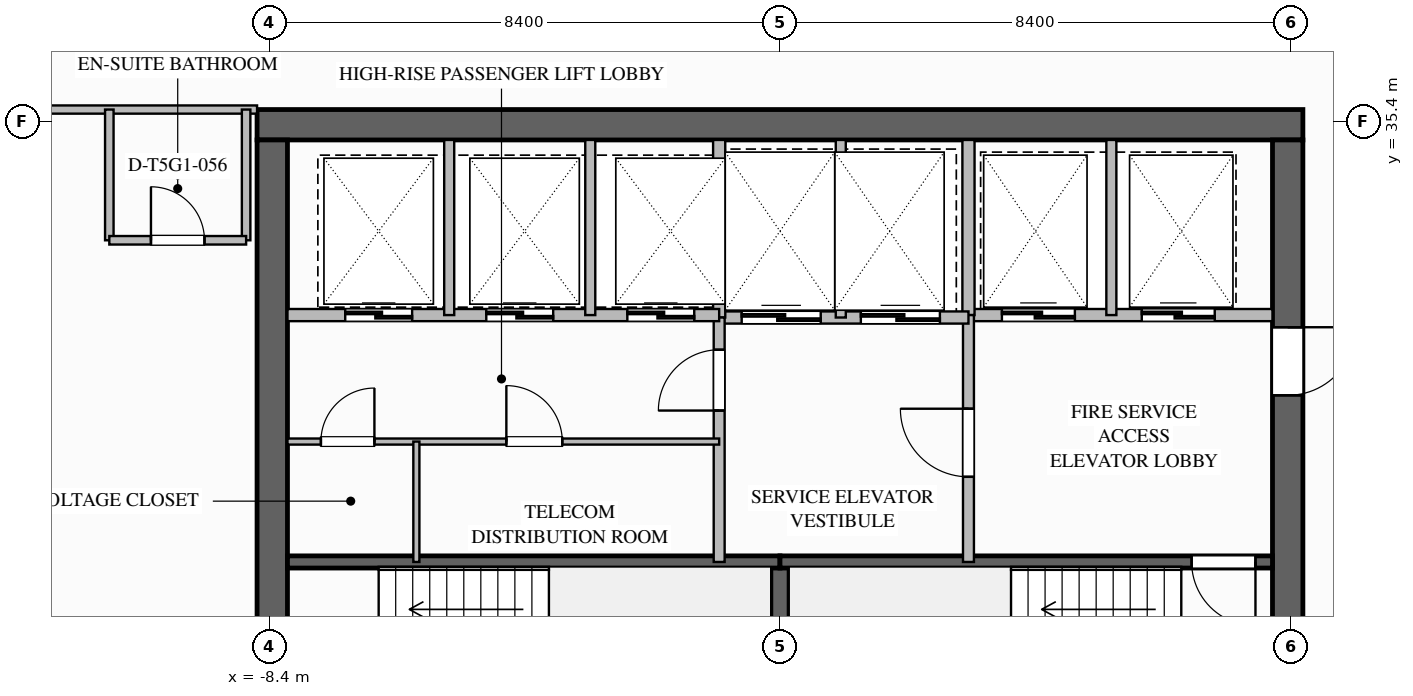
"""IFC4 building model, lengths in metres.
Left out: names, types, materials, properties, quantities, classifications, styles, units other than length and angle.
Written with IfcOpenShell. Run it as: python <this file> out.ifc"""

import sys

from ifc_helpers import new_model, si_unit, direction, frame, frame_2d, origin, place, context, subcontext, project, spatial, rectangle, extrude, element, fill, save


model = new_model("IFC4")
c1 = context("Model", 3, precision=1e-05, world=origin(), true_north=direction((0.0, 1.0)))
c2 = subcontext(c1, "Body", "Model", "MODEL_VIEW")
j1 = project(units=[si_unit("LENGTHUNIT", "METRE"), si_unit("PLANEANGLEUNIT", "RADIAN")], contexts=[c1])
p1 = place(None, origin())
s1 = spatial("IfcSite", under=j1, at=p1, CompositionType="ELEMENT")
p2 = place(p1, origin())
s2 = spatial("IfcBuilding", under=s1, at=p2, CompositionType="ELEMENT")
p3 = place(p2, frame((0.0, 0.0, 268.65)))
s3 = spatial("IfcBuildingStorey", under=s2, at=p3, CompositionType="ELEMENT", Elevation=268.65)
p4 = place(p3, frame((-8.6, 35.35, 0.0), z_axis=(0.0, 0.0, 1.0), x_axis=(1.0, 0.0, 0.0)))
e1 = element("IfcWall", 1, at=p4, inside=s3, PredefinedType="SHEAR", context=c2, shape_type="SweptSolid", body=[
    extrude(rectangle(XDim=17.2, YDim=0.5, at=frame_2d((8.6, 0.0))), origin(), (0.0, 0.0, 1.0), 3.65),
])
p5 = place(p3, frame((8.35, 35.1, 0.0), z_axis=(0.0, 0.0, 1.0), x_axis=(0.0, -1.0, 0.0)))
e2 = element("IfcWall", 2, at=p5, inside=s3, PredefinedType="SHEAR", context=c2, shape_type="SweptSolid", body=[
    extrude(rectangle(XDim=16.2, YDim=0.5, at=frame_2d((8.1, 0.0))), origin(), (0.0, 0.0, 1.0), 3.65),
])
p6 = place(p5, frame((3.08, 0.0, 0.0)))
e3 = element("IfcOpeningElement", 3, at=p6, cuts=e2, PredefinedType="OPENING", context=c2, shape_type="SweptSolid", body=[
    extrude(rectangle(XDim=1.12, YDim=2.1, at=frame_2d((0.56, 1.05))), frame((0.0, 0.26, 0.0), z_axis=(0.0, -1.0, 0.0), x_axis=(1.0, 0.0, 0.0)), (0.0, 0.0, 1.0), 0.52),
])
p7 = place(p5, frame((10.62, 0.0, 0.0)))
e4 = element("IfcOpeningElement", 4, at=p7, cuts=e2, PredefinedType="OPENING", context=c2, shape_type="SweptSolid", body=[
    extrude(rectangle(XDim=1.08, YDim=2.04, at=frame_2d((0.54, 1.02))), frame((0.0, 0.26, 0.0), z_axis=(0.0, -1.0, 0.0), x_axis=(1.0, 0.0, 0.0)), (0.0, 0.0, 1.0), 0.52),
])
p8 = place(p3, frame((-8.35, 18.9, 0.0), z_axis=(0.0, 0.0, 1.0), x_axis=(0.0, 1.0, 0.0)))
e5 = element("IfcWall", 5, at=p8, inside=s3, PredefinedType="SHEAR", context=c2, shape_type="SweptSolid", body=[
    extrude(rectangle(XDim=16.2, YDim=0.5, at=frame_2d((8.1, 0.0))), origin(), (0.0, 0.0, 1.0), 3.65),
])
p9 = place(p3, frame((0.0, 25.04, 0.0), z_axis=(0.0, 0.0, 1.0), x_axis=(0.0, 1.0, 0.0)))
e6 = element("IfcWall", 6, at=p9, inside=s3, PredefinedType="SOLIDWALL", context=c2, shape_type="SweptSolid", body=[
    extrude(rectangle(XDim=3.12, YDim=0.3, at=frame_2d((1.56, 0.0))), origin(), (0.0, 0.0, 1.0), 3.39),
])
p10 = place(p3, frame((-8.1, 28.16, 0.0), z_axis=(0.0, 0.0, 1.0), x_axis=(1.0, 0.0, 0.0)))
e7 = element("IfcWall", 7, at=p10, inside=s3, PredefinedType="SOLIDWALL", context=c2, shape_type="SweptSolid", body=[
    extrude(rectangle(XDim=8.1, YDim=0.2, at=frame_2d((4.05, 0.0))), origin(), (0.0, 0.0, 1.0), 3.39),
])
p11 = place(p3, frame((8.1, 28.16, 0.0), z_axis=(0.0, 0.0, 1.0), x_axis=(-1.0, 0.0, 0.0)))
e8 = element("IfcWall", 8, at=p11, inside=s3, PredefinedType="SOLIDWALL", context=c2, shape_type="SweptSolid", body=[
    extrude(rectangle(XDim=8.1, YDim=0.2, at=frame_2d((4.05, 0.0))), origin(), (0.0, 0.0, 1.0), 3.39),
])
p12 = place(p11, frame((0.28, 0.0, 0.0)))
e9 = element("IfcOpeningElement", 9, at=p12, cuts=e8, PredefinedType="OPENING", context=c2, shape_type="SweptSolid", body=[
    extrude(rectangle(XDim=1.05, YDim=2.1, at=frame_2d((0.525, 1.05))), frame((0.0, 0.11, 0.0), z_axis=(0.0, -1.0, 0.0), x_axis=(1.0, 0.0, 0.0)), (0.0, 0.0, 1.0), 0.22),
])
p13 = place(p3, frame((3.1, 32.22, 0.0), z_axis=(0.0, 0.0, 1.0), x_axis=(1.0, 0.0, 0.0)))
e10 = element("IfcWall", 10, at=p13, inside=s3, PredefinedType="SOLIDWALL", context=c2, shape_type="SweptSolid", body=[
    extrude(rectangle(XDim=5.0, YDim=0.2, at=frame_2d((2.5, 0.0))), origin(), (0.0, 0.0, 1.0), 3.39),
])
p14 = place(p13, frame((0.55, 0.0, 0.0)))
e11 = element("IfcOpeningElement", 11, at=p14, cuts=e10, PredefinedType="OPENING", context=c2, shape_type="SweptSolid", body=[
    extrude(rectangle(XDim=1.2, YDim=2.2, at=frame_2d((0.6, 1.1))), frame((0.0, 0.11, 0.0), z_axis=(0.0, -1.0, 0.0), x_axis=(1.0, 0.0, 0.0)), (0.0, 0.0, 1.0), 0.22),
])
p15 = place(p13, frame((2.85, 0.0, 0.0)))
e12 = element("IfcOpeningElement", 12, at=p15, cuts=e10, PredefinedType="OPENING", context=c2, shape_type="SweptSolid", body=[
    extrude(rectangle(XDim=1.2, YDim=2.2, at=frame_2d((0.6, 1.1))), frame((0.0, 0.11, 0.0), z_axis=(0.0, -1.0, 0.0), x_axis=(1.0, 0.0, 0.0)), (0.0, 0.0, 1.0), 0.22),
])
p16 = place(p3, frame((3.1, 32.22, 0.0), z_axis=(0.0, 0.0, 1.0), x_axis=(0.0, 1.0, 0.0)))
e13 = element("IfcWall", 13, at=p16, inside=s3, PredefinedType="SOLIDWALL", context=c2, shape_type="SweptSolid", body=[
    extrude(rectangle(XDim=2.88, YDim=0.2, at=frame_2d((1.44, 0.0))), origin(), (0.0, 0.0, 1.0), 3.39),
])
p17 = place(p3, frame((5.45, 32.22, 0.0), z_axis=(0.0, 0.0, 1.0), x_axis=(0.0, 1.0, 0.0)))
e14 = element("IfcWall", 14, at=p17, inside=s3, PredefinedType="PARTITIONING", context=c2, shape_type="SweptSolid", body=[
    extrude(rectangle(XDim=2.88, YDim=0.165, at=frame_2d((1.44, 0.0))), origin(), (0.0, 0.0, 1.0), 3.39),
])
p18 = place(p3, frame((3.1, 28.16, 0.0), z_axis=(0.0, 0.0, 1.0), x_axis=(0.0, 1.0, 0.0)))
e15 = element("IfcWall", 15, at=p18, inside=s3, PredefinedType="SOLIDWALL", context=c2, shape_type="SweptSolid", body=[
    extrude(rectangle(XDim=4.06, YDim=0.18, at=frame_2d((2.03, 0.0))), origin(), (0.0, 0.0, 1.0), 3.39),
])
p19 = place(p18, frame((1.4, 0.0, 0.0)))
e16 = element("IfcOpeningElement", 16, at=p19, cuts=e15, PredefinedType="OPENING", context=c2, shape_type="SweptSolid", body=[
    extrude(rectangle(XDim=1.12, YDim=2.1, at=frame_2d((0.56, 1.05))), frame((0.0, 0.1, 0.0), z_axis=(0.0, -1.0, 0.0), x_axis=(1.0, 0.0, 0.0)), (0.0, 0.0, 1.0), 0.2),
])
p20 = place(p3, frame((-1.0, 32.18, 0.0), z_axis=(0.0, 0.0, 1.0), x_axis=(1.0, 0.0, 0.0)))
e17 = element("IfcWall", 17, at=p20, inside=s3, PredefinedType="SOLIDWALL", context=c2, shape_type="SweptSolid", body=[
    extrude(rectangle(XDim=4.1, YDim=0.2, at=frame_2d((2.05, 0.0))), origin(), (0.0, 0.0, 1.0), 3.39),
])
p21 = place(p20, frame((0.37, 0.0, 0.0)))
e18 = element("IfcOpeningElement", 18, at=p21, cuts=e17, PredefinedType="OPENING", context=c2, shape_type="SweptSolid", body=[
    extrude(rectangle(XDim=1.3, YDim=2.2, at=frame_2d((0.65, 1.1))), frame((0.0, 0.11, 0.0), z_axis=(0.0, -1.0, 0.0), x_axis=(1.0, 0.0, 0.0)), (0.0, 0.0, 1.0), 0.22),
])
p22 = place(p20, frame((2.33, 0.0, 0.0)))
e19 = element("IfcOpeningElement", 19, at=p22, cuts=e17, PredefinedType="OPENING", context=c2, shape_type="SweptSolid", body=[
    extrude(rectangle(XDim=1.3, YDim=2.2, at=frame_2d((0.65, 1.1))), frame((0.0, 0.11, 0.0), z_axis=(0.0, -1.0, 0.0), x_axis=(1.0, 0.0, 0.0)), (0.0, 0.0, 1.0), 0.22),
])
p23 = place(p3, frame((-1.0, 32.18, 0.0), z_axis=(0.0, 0.0, 1.0), x_axis=(0.0, 1.0, 0.0)))
e20 = element("IfcWall", 20, at=p23, inside=s3, PredefinedType="SOLIDWALL", context=c2, shape_type="SweptSolid", body=[
    extrude(rectangle(XDim=2.92, YDim=0.2, at=frame_2d((1.46, 0.0))), origin(), (0.0, 0.0, 1.0), 3.39),
])
p24 = place(p3, frame((1.0, 32.18, 0.0), z_axis=(0.0, 0.0, 1.0), x_axis=(0.0, 1.0, 0.0)))
e21 = element("IfcWall", 21, at=p24, inside=s3, PredefinedType="PARTITIONING", context=c2, shape_type="SweptSolid", body=[
    extrude(rectangle(XDim=2.92, YDim=0.165, at=frame_2d((1.46, 0.0))), origin(), (0.0, 0.0, 1.0), 3.39),
])
p25 = place(p3, frame((-1.0, 28.16, 0.0), z_axis=(0.0, 0.0, 1.0), x_axis=(0.0, 1.0, 0.0)))
e22 = element("IfcWall", 22, at=p25, inside=s3, PredefinedType="SOLIDWALL", context=c2, shape_type="SweptSolid", body=[
    extrude(rectangle(XDim=4.02, YDim=0.18, at=frame_2d((2.01, 0.0))), origin(), (0.0, 0.0, 1.0), 3.39),
])
p26 = place(p25, frame((2.49, 0.0, 0.0)))
e23 = element("IfcOpeningElement", 23, at=p26, cuts=e22, PredefinedType="OPENING", context=c2, shape_type="SweptSolid", body=[
    extrude(rectangle(XDim=1.0, YDim=2.1, at=frame_2d((0.5, 1.05))), frame((0.0, 0.1, 0.0), z_axis=(0.0, -1.0, 0.0), x_axis=(1.0, 0.0, 0.0)), (0.0, 0.0, 1.0), 0.2),
])
p27 = place(p3, frame((-8.1, 32.22, 0.0), z_axis=(0.0, 0.0, 1.0), x_axis=(1.0, 0.0, 0.0)))
e24 = element("IfcWall", 24, at=p27, inside=s3, PredefinedType="SOLIDWALL", context=c2, shape_type="SweptSolid", body=[
    extrude(rectangle(XDim=7.1, YDim=0.2, at=frame_2d((3.55, 0.0))), origin(), (0.0, 0.0, 1.0), 3.39),
])
p28 = place(p27, frame((0.95, 0.0, 0.0)))
e25 = element("IfcOpeningElement", 25, at=p28, cuts=e24, PredefinedType="OPENING", context=c2, shape_type="SweptSolid", body=[
    extrude(rectangle(XDim=1.1, YDim=2.2, at=frame_2d((0.55, 1.1))), frame((0.0, 0.11, 0.0), z_axis=(0.0, -1.0, 0.0), x_axis=(1.0, 0.0, 0.0)), (0.0, 0.0, 1.0), 0.22),
])
p29 = place(p27, frame((3.27, 0.0, 0.0)))
e26 = element("IfcOpeningElement", 26, at=p29, cuts=e24, PredefinedType="OPENING", context=c2, shape_type="SweptSolid", body=[
    extrude(rectangle(XDim=1.1, YDim=2.2, at=frame_2d((0.55, 1.1))), frame((0.0, 0.11, 0.0), z_axis=(0.0, -1.0, 0.0), x_axis=(1.0, 0.0, 0.0)), (0.0, 0.0, 1.0), 0.22),
])
p30 = place(p27, frame((5.59, 0.0, 0.0)))
e27 = element("IfcOpeningElement", 27, at=p30, cuts=e24, PredefinedType="OPENING", context=c2, shape_type="SweptSolid", body=[
    extrude(rectangle(XDim=1.1, YDim=2.2, at=frame_2d((0.55, 1.1))), frame((0.0, 0.11, 0.0), z_axis=(0.0, -1.0, 0.0), x_axis=(1.0, 0.0, 0.0)), (0.0, 0.0, 1.0), 0.22),
])
for number, where, z_axis, x_axis in (
    (28, (-5.44, 32.22, 0.0), (0.0, 0.0, 1.0), (0.0, 1.0, 0.0)),
    (29, (-3.12, 32.22, 0.0), (0.0, 0.0, 1.0), (0.0, 1.0, 0.0)),
):
    element("IfcWall", number, at=place(p3, frame(where, z_axis=z_axis, x_axis=x_axis)), inside=s3, PredefinedType="PARTITIONING", context=c2, shape_type="SweptSolid", body=[
        extrude(rectangle(XDim=2.88, YDim=0.165, at=frame_2d((1.44, 0.0))), origin(), (0.0, 0.0, 1.0), 3.39),
    ])
p31 = place(p3, frame((-8.1, 30.14, 0.0), z_axis=(0.0, 0.0, 1.0), x_axis=(1.0, 0.0, 0.0)))
e30 = element("IfcWall", 30, at=p31, inside=s3, PredefinedType="PARTITIONING", context=c2, shape_type="SweptSolid", body=[
    extrude(rectangle(XDim=7.1, YDim=0.1, at=frame_2d((3.55, 0.0))), origin(), (0.0, 0.0, 1.0), 3.39),
])
p32 = place(p31, frame((0.55, 0.0, 0.0)))
e31 = element("IfcOpeningElement", 31, at=p32, cuts=e30, PredefinedType="OPENING", context=c2, shape_type="SweptSolid", body=[
    extrude(rectangle(XDim=0.88, YDim=2.1, at=frame_2d((0.44, 1.05))), frame((0.0, 0.06, 0.0), z_axis=(0.0, -1.0, 0.0), x_axis=(1.0, 0.0, 0.0)), (0.0, 0.0, 1.0), 0.12),
])
p33 = place(p31, frame((3.6, 0.0, 0.0)))
e32 = element("IfcOpeningElement", 32, at=p33, cuts=e30, PredefinedType="OPENING", context=c2, shape_type="SweptSolid", body=[
    extrude(rectangle(XDim=0.92, YDim=2.1, at=frame_2d((0.46, 1.05))), frame((0.0, 0.06, 0.0), z_axis=(0.0, -1.0, 0.0), x_axis=(1.0, 0.0, 0.0)), (0.0, 0.0, 1.0), 0.12),
])
p34 = place(p3, frame((-5.98, 28.16, 0.0), z_axis=(0.0, 0.0, 1.0), x_axis=(0.0, 1.0, 0.0)))
e33 = element("IfcWall", 33, at=p34, inside=s3, PredefinedType="PARTITIONING", context=c2, shape_type="SweptSolid", body=[
    extrude(rectangle(XDim=1.98, YDim=0.1, at=frame_2d((0.99, 0.0))), origin(), (0.0, 0.0, 1.0), 3.39),
])
p35 = place(p3, frame((-16.2, 35.6, 0.0), z_axis=(0.0, 0.0, 1.0), x_axis=(1.0, 0.0, 0.0)))
e34 = element("IfcWall", 34, at=p35, inside=s3, PredefinedType="PARTITIONING", context=c2, shape_type="SweptSolid", body=[
    extrude(rectangle(XDim=7.6, YDim=0.135, at=frame_2d((3.8, 0.0))), origin(), (0.0, 0.0, 1.0), 2.768),
])
p36 = place(p35, frame((2.155, 0.0, 0.0)))
e35 = element("IfcOpeningElement", 35, at=p36, cuts=e34, PredefinedType="OPENING", context=c2, shape_type="SweptSolid", body=[
    extrude(rectangle(XDim=1.26, YDim=2.2, at=frame_2d((0.63, 1.1))), frame((0.0, 0.077, 0.0), z_axis=(0.0, -1.0, 0.0), x_axis=(1.0, 0.0, 0.0)), (0.0, 0.0, 1.0), 0.155),
])
for number, where, z_axis, x_axis in (
    (36, (-11.03, 35.6, 0.0), (0.0, 0.0, 1.0), (0.0, -1.0, 0.0)),
    (37, (-8.78, 35.6, 0.0), (0.0, 0.0, 1.0), (0.0, -1.0, 0.0)),
):
    element("IfcWall", number, at=place(p3, frame(where, z_axis=z_axis, x_axis=x_axis)), inside=s3, PredefinedType="PLUMBINGWALL", context=c2, shape_type="SweptSolid", body=[
        extrude(rectangle(XDim=2.15, YDim=0.14, at=frame_2d((1.075, 0.0))), origin(), (0.0, 0.0, 1.0), 3.39),
    ])
p37 = place(p3, frame((-11.03, 33.45, 0.0), z_axis=(0.0, 0.0, 1.0), x_axis=(1.0, 0.0, 0.0)))
e38 = element("IfcWall", 38, at=p37, inside=s3, PredefinedType="PLUMBINGWALL", context=c2, shape_type="SweptSolid", body=[
    extrude(rectangle(XDim=2.25, YDim=0.14, at=frame_2d((1.125, 0.0))), origin(), (0.0, 0.0, 1.0), 3.39),
])
p38 = place(p37, frame((0.685, 0.0, 0.0)))
e39 = element("IfcOpeningElement", 39, at=p38, cuts=e38, PredefinedType="OPENING", context=c2, shape_type="SweptSolid", body=[
    extrude(rectangle(XDim=0.88, YDim=2.1, at=frame_2d((0.44, 1.05))), frame((0.0, 0.08, 0.0), z_axis=(0.0, -1.0, 0.0), x_axis=(1.0, 0.0, 0.0)), (0.0, 0.0, 1.0), 0.16),
])
p39 = place(p12, origin())
e40 = element("IfcDoor", 40, at=p39, inside=s3, OperationType="SINGLE_SWING_LEFT", PredefinedType="DOOR", context=c2, shape_type="SweptSolid", body=[
    extrude(rectangle(XDim=1.05, YDim=2.1, at=frame_2d((0.525, 1.05))), frame((0.0, 0.025, 0.0), z_axis=(0.0, -1.0, 0.0), x_axis=(1.0, 0.0, 0.0)), (0.0, 0.0, 1.0), 0.05),
])
fill(e9, e40)
p40 = place(p14, origin())
e41 = element("IfcDoor", 41, at=p40, inside=s3, OperationType="SLIDING_TO_LEFT", PredefinedType="DOOR", context=c2, shape_type="SweptSolid", body=[
    extrude(rectangle(XDim=1.2, YDim=2.2, at=frame_2d((0.6, 1.1))), frame((0.0, 0.025, 0.0), z_axis=(0.0, -1.0, 0.0), x_axis=(1.0, 0.0, 0.0)), (0.0, 0.0, 1.0), 0.05),
])
fill(e11, e41)
p41 = place(p15, origin())
e42 = element("IfcDoor", 42, at=p41, inside=s3, OperationType="SLIDING_TO_LEFT", PredefinedType="DOOR", context=c2, shape_type="SweptSolid", body=[
    extrude(rectangle(XDim=1.2, YDim=2.2, at=frame_2d((0.6, 1.1))), frame((0.0, 0.025, 0.0), z_axis=(0.0, -1.0, 0.0), x_axis=(1.0, 0.0, 0.0)), (0.0, 0.0, 1.0), 0.05),
])
fill(e12, e42)
p42 = place(p19, origin())
e43 = element("IfcDoor", 43, at=p42, inside=s3, OperationType="SINGLE_SWING_RIGHT", PredefinedType="DOOR", context=c2, shape_type="SweptSolid", body=[
    extrude(rectangle(XDim=1.12, YDim=2.1, at=frame_2d((0.56, 1.05))), frame((0.0, 0.025, 0.0), z_axis=(0.0, -1.0, 0.0), x_axis=(1.0, 0.0, 0.0)), (0.0, 0.0, 1.0), 0.05),
])
fill(e16, e43)
p43 = place(p6, origin())
e44 = element("IfcDoor", 44, at=p43, inside=s3, OperationType="SINGLE_SWING_LEFT", PredefinedType="DOOR", context=c2, shape_type="SweptSolid", body=[
    extrude(rectangle(XDim=1.12, YDim=2.1, at=frame_2d((0.56, 1.05))), frame((0.0, 0.025, 0.0), z_axis=(0.0, -1.0, 0.0), x_axis=(1.0, 0.0, 0.0)), (0.0, 0.0, 1.0), 0.05),
])
fill(e3, e44)
p44 = place(p21, origin())
e45 = element("IfcDoor", 45, at=p44, inside=s3, OperationType="SLIDING_TO_LEFT", PredefinedType="DOOR", context=c2, shape_type="SweptSolid", body=[
    extrude(rectangle(XDim=1.3, YDim=2.2, at=frame_2d((0.65, 1.1))), frame((0.0, 0.025, 0.0), z_axis=(0.0, -1.0, 0.0), x_axis=(1.0, 0.0, 0.0)), (0.0, 0.0, 1.0), 0.05),
])
fill(e18, e45)
p45 = place(p22, origin())
e46 = element("IfcDoor", 46, at=p45, inside=s3, OperationType="SLIDING_TO_LEFT", PredefinedType="DOOR", context=c2, shape_type="SweptSolid", body=[
    extrude(rectangle(XDim=1.3, YDim=2.2, at=frame_2d((0.65, 1.1))), frame((0.0, 0.025, 0.0), z_axis=(0.0, -1.0, 0.0), x_axis=(1.0, 0.0, 0.0)), (0.0, 0.0, 1.0), 0.05),
])
fill(e19, e46)
p46 = place(p26, origin())
e47 = element("IfcDoor", 47, at=p46, inside=s3, OperationType="SINGLE_SWING_LEFT", PredefinedType="DOOR", context=c2, shape_type="SweptSolid", body=[
    extrude(rectangle(XDim=1.0, YDim=2.1, at=frame_2d((0.5, 1.05))), frame((0.0, 0.025, 0.0), z_axis=(0.0, -1.0, 0.0), x_axis=(1.0, 0.0, 0.0)), (0.0, 0.0, 1.0), 0.05),
])
fill(e23, e47)
p47 = place(p28, origin())
e48 = element("IfcDoor", 48, at=p47, inside=s3, OperationType="SLIDING_TO_LEFT", PredefinedType="DOOR", context=c2, shape_type="SweptSolid", body=[
    extrude(rectangle(XDim=1.1, YDim=2.2, at=frame_2d((0.55, 1.1))), frame((0.0, 0.025, 0.0), z_axis=(0.0, -1.0, 0.0), x_axis=(1.0, 0.0, 0.0)), (0.0, 0.0, 1.0), 0.05),
])
fill(e25, e48)
p48 = place(p29, origin())
e49 = element("IfcDoor", 49, at=p48, inside=s3, OperationType="SLIDING_TO_LEFT", PredefinedType="DOOR", context=c2, shape_type="SweptSolid", body=[
    extrude(rectangle(XDim=1.1, YDim=2.2, at=frame_2d((0.55, 1.1))), frame((0.0, 0.025, 0.0), z_axis=(0.0, -1.0, 0.0), x_axis=(1.0, 0.0, 0.0)), (0.0, 0.0, 1.0), 0.05),
])
fill(e26, e49)
p49 = place(p30, origin())
e50 = element("IfcDoor", 50, at=p49, inside=s3, OperationType="SLIDING_TO_LEFT", PredefinedType="DOOR", context=c2, shape_type="SweptSolid", body=[
    extrude(rectangle(XDim=1.1, YDim=2.2, at=frame_2d((0.55, 1.1))), frame((0.0, 0.025, 0.0), z_axis=(0.0, -1.0, 0.0), x_axis=(1.0, 0.0, 0.0)), (0.0, 0.0, 1.0), 0.05),
])
fill(e27, e50)
p50 = place(p32, origin())
e51 = element("IfcDoor", 51, at=p50, inside=s3, OperationType="SINGLE_SWING_RIGHT", PredefinedType="DOOR", context=c2, shape_type="SweptSolid", body=[
    extrude(rectangle(XDim=0.88, YDim=2.1, at=frame_2d((0.44, 1.05))), frame((0.0, 0.025, 0.0), z_axis=(0.0, -1.0, 0.0), x_axis=(1.0, 0.0, 0.0)), (0.0, 0.0, 1.0), 0.05),
])
fill(e31, e51)
p51 = place(p33, origin())
e52 = element("IfcDoor", 52, at=p51, inside=s3, OperationType="SINGLE_SWING_LEFT", PredefinedType="DOOR", context=c2, shape_type="SweptSolid", body=[
    extrude(rectangle(XDim=0.92, YDim=2.1, at=frame_2d((0.46, 1.05))), frame((0.0, 0.025, 0.0), z_axis=(0.0, -1.0, 0.0), x_axis=(1.0, 0.0, 0.0)), (0.0, 0.0, 1.0), 0.05),
])
fill(e32, e52)
p52 = place(p38, origin())
e53 = element("IfcDoor", 53, at=p52, inside=s3, OperationType="SINGLE_SWING_LEFT", PredefinedType="DOOR", context=c2, shape_type="SweptSolid", body=[
    extrude(rectangle(XDim=0.88, YDim=2.1, at=frame_2d((0.44, 1.05))), frame((0.0, 0.025, 0.0), z_axis=(0.0, -1.0, 0.0), x_axis=(1.0, 0.0, 0.0)), (0.0, 0.0, 1.0), 0.05),
])
fill(e39, e53)
save(model, sys.argv[1])
